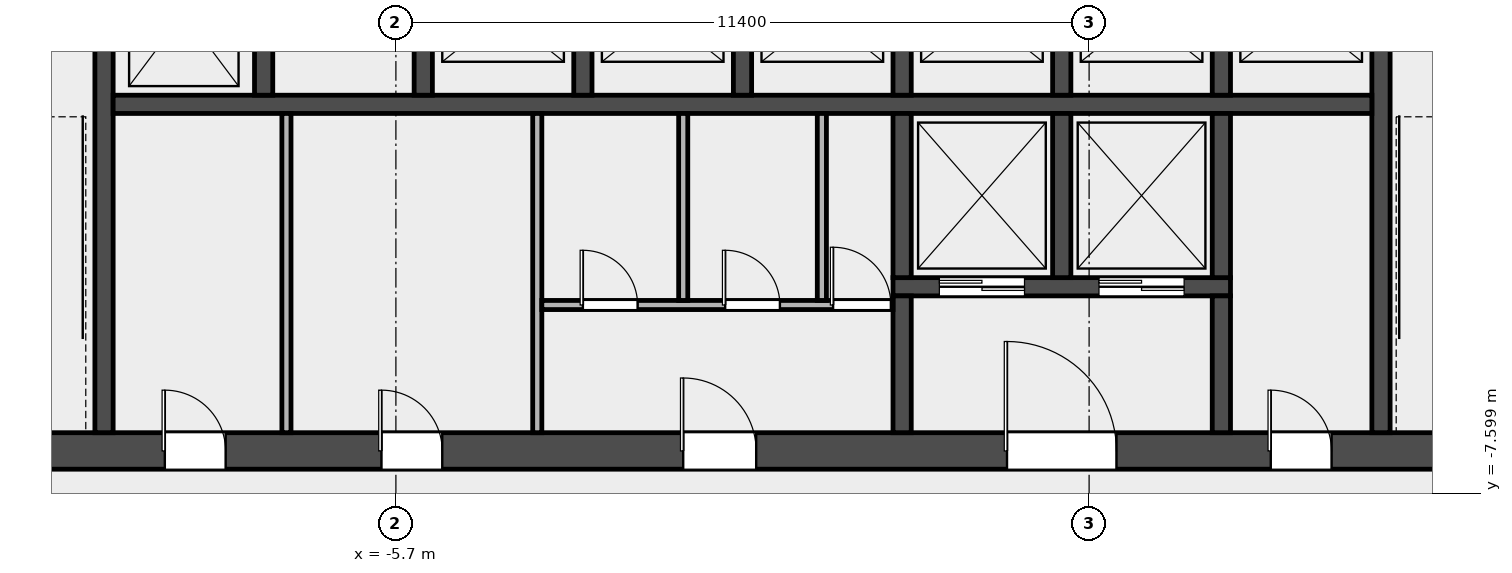
"""IFC4 building model, lengths in metres.
Left out: names, types, materials, properties, quantities, classifications, styles, units other than length and angle.
Written with IfcOpenShell. Run it as: python <this file> out.ifc"""

import sys

from ifc_helpers import new_model, si_unit, direction, frame, frame_2d, origin, place, context, subcontext, project, spatial, rectangle, extrude, element, fill, save


model = new_model("IFC4")
c1 = context("Model", 3, precision=1e-05, world=origin(), true_north=direction((0.0, 1.0)))
c2 = subcontext(c1, "Body", "Model", "MODEL_VIEW")
j1 = project(units=[si_unit("LENGTHUNIT", "METRE"), si_unit("PLANEANGLEUNIT", "RADIAN")], contexts=[c1])
p1 = place(None, origin())
s1 = spatial("IfcSite", under=j1, at=p1, CompositionType="ELEMENT")
p2 = place(p1, origin())
s2 = spatial("IfcBuilding", under=s1, at=p2, CompositionType="ELEMENT")
p3 = place(p2, frame((0.0, 0.0, 55.0)))
s3 = spatial("IfcBuildingStorey", under=s2, at=p3, CompositionType="ELEMENT", Elevation=55.0)
p4 = place(p3, frame((-14.4, -6.9, 0.0), z_axis=(0.0, 0.0, 1.0), x_axis=(1.0, 0.0, 0.0)))
e1 = element("IfcWall", 1, at=p4, inside=s3, PredefinedType="SHEAR", context=c2, shape_type="SweptSolid", body=[
    extrude(rectangle(XDim=28.8, YDim=0.6, at=frame_2d((14.4, 0.0))), origin(), (0.0, 0.0, 1.0), 4.5),
])
p5 = place(p4, frame((4.9, 0.0, 0.0)))
e2 = element("IfcOpeningElement", 2, at=p5, cuts=e1, PredefinedType="OPENING", context=c2, shape_type="SweptSolid", body=[
    extrude(rectangle(XDim=1.0, YDim=2.1, at=frame_2d((0.5, 1.05))), frame((0.0, 0.312, 0.0), z_axis=(0.0, -1.0, 0.0), x_axis=(1.0, 0.0, 0.0)), (0.0, 0.0, 1.0), 0.624),
])
p6 = place(p4, frame((8.462, 0.0, 0.0)))
e3 = element("IfcOpeningElement", 3, at=p6, cuts=e1, PredefinedType="OPENING", context=c2, shape_type="SweptSolid", body=[
    extrude(rectangle(XDim=1.0, YDim=2.1, at=frame_2d((0.5, 1.05))), frame((0.0, 0.312, 0.0), z_axis=(0.0, -1.0, 0.0), x_axis=(1.0, 0.0, 0.0)), (0.0, 0.0, 1.0), 0.624),
])
p7 = place(p4, frame((13.425, 0.0, 0.0)))
e4 = element("IfcOpeningElement", 4, at=p7, cuts=e1, PredefinedType="OPENING", context=c2, shape_type="SweptSolid", body=[
    extrude(rectangle(XDim=1.2, YDim=2.1, at=frame_2d((0.6, 1.05))), frame((0.0, 0.312, 0.0), z_axis=(0.0, -1.0, 0.0), x_axis=(1.0, 0.0, 0.0)), (0.0, 0.0, 1.0), 0.624),
])
p8 = place(p4, frame((18.75, 0.0, 0.0)))
e5 = element("IfcOpeningElement", 5, at=p8, cuts=e1, PredefinedType="OPENING", context=c2, shape_type="SweptSolid", body=[
    extrude(rectangle(XDim=1.8, YDim=2.1, at=frame_2d((0.9, 1.05))), frame((0.0, 0.312, 0.0), z_axis=(0.0, -1.0, 0.0), x_axis=(1.0, 0.0, 0.0)), (0.0, 0.0, 1.0), 0.624),
])
p9 = place(p4, frame((23.087, 0.0, 0.0)))
e6 = element("IfcOpeningElement", 6, at=p9, cuts=e1, PredefinedType="OPENING", context=c2, shape_type="SweptSolid", body=[
    extrude(rectangle(XDim=1.0, YDim=2.1, at=frame_2d((0.5, 1.05))), frame((0.0, 0.312, 0.0), z_axis=(0.0, -1.0, 0.0), x_axis=(1.0, 0.0, 0.0)), (0.0, 0.0, 1.0), 0.624),
])
for number, where, z_axis, x_axis in (
    (7, (-10.5, -6.6, 0.0), (0.0, 0.0, 1.0), (0.0, 1.0, 0.0)),
    (8, (10.5, -6.6, 0.0), (0.0, 0.0, 1.0), (0.0, 1.0, 0.0)),
):
    element("IfcWall", number, at=place(p3, frame(where, z_axis=z_axis, x_axis=x_axis)), inside=s3, PredefinedType="SHEAR", context=c2, shape_type="SweptSolid", body=[
        extrude(rectangle(XDim=8.55, YDim=0.3, at=frame_2d((4.275, 0.0))), origin(), (0.0, 0.0, 1.0), 4.5),
    ])
p10 = place(p3, frame((-10.35, -1.2, 0.0), z_axis=(0.0, 0.0, 1.0), x_axis=(1.0, 0.0, 0.0)))
e9 = element("IfcWall", 9, at=p10, inside=s3, PredefinedType="SOLIDWALL", context=c2, shape_type="SweptSolid", body=[
    extrude(rectangle(XDim=20.7, YDim=0.3, at=frame_2d((10.35, 0.0))), origin(), (0.0, 0.0, 1.0), 4.5),
])
for number, where, z_axis, x_axis in (
    (10, (-7.875, -1.05, 0.0), (0.0, 0.0, 1.0), (0.0, 1.0, 0.0)),
    (11, (-5.25, -1.05, 0.0), (0.0, 0.0, 1.0), (0.0, 1.0, 0.0)),
    (12, (-2.625, -1.05, 0.0), (0.0, 0.0, 1.0), (0.0, 1.0, 0.0)),
    (13, (0.0, -1.05, 0.0), (0.0, 0.0, 1.0), (0.0, 1.0, 0.0)),
    (14, (2.625, -1.05, 0.0), (0.0, 0.0, 1.0), (0.0, 1.0, 0.0)),
    (15, (5.25, -1.05, 0.0), (0.0, 0.0, 1.0), (0.0, 1.0, 0.0)),
    (16, (7.875, -1.05, 0.0), (0.0, 0.0, 1.0), (0.0, 1.0, 0.0)),
):
    element("IfcWall", number, at=place(p3, frame(where, z_axis=z_axis, x_axis=x_axis)), inside=s3, PredefinedType="SOLIDWALL", context=c2, shape_type="SweptSolid", body=[
        extrude(rectangle(XDim=2.7, YDim=0.3, at=frame_2d((1.35, 0.0))), origin(), (0.0, 0.0, 1.0), 4.5),
    ])
p11 = place(p3, frame((2.475, -4.2, 0.0), z_axis=(0.0, 0.0, 1.0), x_axis=(1.0, 0.0, 0.0)))
e17 = element("IfcWall", 17, at=p11, inside=s3, PredefinedType="SOLIDWALL", context=c2, shape_type="SweptSolid", body=[
    extrude(rectangle(XDim=5.55, YDim=0.3, at=frame_2d((2.775, 0.0))), origin(), (0.0, 0.0, 1.0), 4.5),
])
p12 = place(p11, frame((0.762, 0.0, 0.0)))
e18 = element("IfcOpeningElement", 18, at=p12, cuts=e17, PredefinedType="OPENING", context=c2, shape_type="SweptSolid", body=[
    extrude(rectangle(XDim=1.4, YDim=2.1, at=frame_2d((0.7, 1.05))), frame((0.0, 0.162, 0.0), z_axis=(0.0, -1.0, 0.0), x_axis=(1.0, 0.0, 0.0)), (0.0, 0.0, 1.0), 0.324),
])
p13 = place(p11, frame((3.387, 0.0, 0.0)))
e19 = element("IfcOpeningElement", 19, at=p13, cuts=e17, PredefinedType="OPENING", context=c2, shape_type="SweptSolid", body=[
    extrude(rectangle(XDim=1.4, YDim=2.1, at=frame_2d((0.7, 1.05))), frame((0.0, 0.162, 0.0), z_axis=(0.0, -1.0, 0.0), x_axis=(1.0, 0.0, 0.0)), (0.0, 0.0, 1.0), 0.324),
])
p14 = place(p3, frame((2.625, -4.05, 0.0), z_axis=(0.0, 0.0, 1.0), x_axis=(0.0, 1.0, 0.0)))
e20 = element("IfcWall", 20, at=p14, inside=s3, PredefinedType="SOLIDWALL", context=c2, shape_type="SweptSolid", body=[
    extrude(rectangle(XDim=2.7, YDim=0.3, at=frame_2d((1.35, 0.0))), origin(), (0.0, 0.0, 1.0), 4.5),
])
p15 = place(p3, frame((2.625, -6.6, 0.0), z_axis=(0.0, 0.0, 1.0), x_axis=(0.0, 1.0, 0.0)))
e21 = element("IfcWall", 21, at=p15, inside=s3, PredefinedType="SOLIDWALL", context=c2, shape_type="SweptSolid", body=[
    extrude(rectangle(XDim=2.25, YDim=0.3, at=frame_2d((1.125, 0.0))), origin(), (0.0, 0.0, 1.0), 4.5),
])
for number, where, z_axis, x_axis in (
    (22, (5.25, -4.05, 0.0), (0.0, 0.0, 1.0), (0.0, 1.0, 0.0)),
    (23, (7.875, -4.05, 0.0), (0.0, 0.0, 1.0), (0.0, 1.0, 0.0)),
):
    element("IfcWall", number, at=place(p3, frame(where, z_axis=z_axis, x_axis=x_axis)), inside=s3, PredefinedType="SOLIDWALL", context=c2, shape_type="SweptSolid", body=[
        extrude(rectangle(XDim=2.7, YDim=0.3, at=frame_2d((1.35, 0.0))), origin(), (0.0, 0.0, 1.0), 4.5),
    ])
p16 = place(p3, frame((7.875, -6.6, 0.0), z_axis=(0.0, 0.0, 1.0), x_axis=(0.0, 1.0, 0.0)))
e24 = element("IfcWall", 24, at=p16, inside=s3, PredefinedType="SOLIDWALL", context=c2, shape_type="SweptSolid", body=[
    extrude(rectangle(XDim=2.25, YDim=0.3, at=frame_2d((1.125, 0.0))), origin(), (0.0, 0.0, 1.0), 4.5),
])
for number, where, z_axis, x_axis in (
    (25, (-7.5, -6.6, 0.0), (0.0, 0.0, 1.0), (0.0, 1.0, 0.0)),
    (26, (-3.375, -6.6, 0.0), (0.0, 0.0, 1.0), (0.0, 1.0, 0.0)),
):
    element("IfcWall", number, at=place(p3, frame(where, z_axis=z_axis, x_axis=x_axis)), inside=s3, PredefinedType="PARTITIONING", context=c2, shape_type="SweptSolid", body=[
        extrude(rectangle(XDim=5.25, YDim=0.15, at=frame_2d((2.625, 0.0))), origin(), (0.0, 0.0, 1.0), 4.5),
    ])
p17 = place(p3, frame((-3.3, -4.5, 0.0), z_axis=(0.0, 0.0, 1.0), x_axis=(1.0, 0.0, 0.0)))
e27 = element("IfcWall", 27, at=p17, inside=s3, PredefinedType="PARTITIONING", context=c2, shape_type="SweptSolid", body=[
    extrude(rectangle(XDim=5.775, YDim=0.15, at=frame_2d((2.888, 0.0))), origin(), (0.0, 0.0, 1.0), 4.5),
])
p18 = place(p17, frame((0.675, 0.0, 0.0)))
e28 = element("IfcOpeningElement", 28, at=p18, cuts=e27, PredefinedType="OPENING", context=c2, shape_type="SweptSolid", body=[
    extrude(rectangle(XDim=0.9, YDim=2.1, at=frame_2d((0.45, 1.05))), frame((0.0, 0.087, 0.0), z_axis=(0.0, -1.0, 0.0), x_axis=(1.0, 0.0, 0.0)), (0.0, 0.0, 1.0), 0.174),
])
p19 = place(p17, frame((3.015, 0.0, 0.0)))
e29 = element("IfcOpeningElement", 29, at=p19, cuts=e27, PredefinedType="OPENING", context=c2, shape_type="SweptSolid", body=[
    extrude(rectangle(XDim=0.9, YDim=2.1, at=frame_2d((0.45, 1.05))), frame((0.0, 0.087, 0.0), z_axis=(0.0, -1.0, 0.0), x_axis=(1.0, 0.0, 0.0)), (0.0, 0.0, 1.0), 0.174),
])
p20 = place(p17, frame((4.79, 0.0, 0.0)))
e30 = element("IfcOpeningElement", 30, at=p20, cuts=e27, PredefinedType="OPENING", context=c2, shape_type="SweptSolid", body=[
    extrude(rectangle(XDim=0.95, YDim=2.1, at=frame_2d((0.475, 1.05))), frame((0.0, 0.087, 0.0), z_axis=(0.0, -1.0, 0.0), x_axis=(1.0, 0.0, 0.0)), (0.0, 0.0, 1.0), 0.174),
])
for number, where, z_axis, x_axis in (
    (31, (-0.975, -4.425, 0.0), (0.0, 0.0, 1.0), (0.0, 1.0, 0.0)),
    (32, (1.305, -4.425, 0.0), (0.0, 0.0, 1.0), (0.0, 1.0, 0.0)),
):
    element("IfcWall", number, at=place(p3, frame(where, z_axis=z_axis, x_axis=x_axis)), inside=s3, PredefinedType="PARTITIONING", context=c2, shape_type="SweptSolid", body=[
        extrude(rectangle(XDim=3.075, YDim=0.15, at=frame_2d((1.538, 0.0))), origin(), (0.0, 0.0, 1.0), 4.5),
    ])
p21 = place(p12, origin())
e33 = element("IfcDoor", 33, at=p21, inside=s3, OperationType="DOUBLE_DOOR_SLIDING", PredefinedType="DOOR", context=c2, shape_type="SweptSolid", body=[
    extrude(rectangle(XDim=1.4, YDim=2.1, at=frame_2d((0.7, 1.05))), frame((0.0, 0.025, 0.0), z_axis=(0.0, -1.0, 0.0), x_axis=(1.0, 0.0, 0.0)), (0.0, 0.0, 1.0), 0.05),
])
fill(e18, e33)
p22 = place(p13, origin())
e34 = element("IfcDoor", 34, at=p22, inside=s3, OperationType="DOUBLE_DOOR_SLIDING", PredefinedType="DOOR", context=c2, shape_type="SweptSolid", body=[
    extrude(rectangle(XDim=1.4, YDim=2.1, at=frame_2d((0.7, 1.05))), frame((0.0, 0.025, 0.0), z_axis=(0.0, -1.0, 0.0), x_axis=(1.0, 0.0, 0.0)), (0.0, 0.0, 1.0), 0.05),
])
fill(e19, e34)
p23 = place(p5, origin())
e35 = element("IfcDoor", 35, at=p23, inside=s3, OperationType="SINGLE_SWING_LEFT", PredefinedType="DOOR", context=c2, shape_type="SweptSolid", body=[
    extrude(rectangle(XDim=1.0, YDim=2.1, at=frame_2d((0.5, 1.05))), frame((0.0, 0.025, 0.0), z_axis=(0.0, -1.0, 0.0), x_axis=(1.0, 0.0, 0.0)), (0.0, 0.0, 1.0), 0.05),
])
fill(e2, e35)
p24 = place(p6, origin())
e36 = element("IfcDoor", 36, at=p24, inside=s3, OperationType="SINGLE_SWING_LEFT", PredefinedType="DOOR", context=c2, shape_type="SweptSolid", body=[
    extrude(rectangle(XDim=1.0, YDim=2.1, at=frame_2d((0.5, 1.05))), frame((0.0, 0.025, 0.0), z_axis=(0.0, -1.0, 0.0), x_axis=(1.0, 0.0, 0.0)), (0.0, 0.0, 1.0), 0.05),
])
fill(e3, e36)
p25 = place(p7, origin())
e37 = element("IfcDoor", 37, at=p25, inside=s3, OperationType="SINGLE_SWING_LEFT", PredefinedType="DOOR", context=c2, shape_type="SweptSolid", body=[
    extrude(rectangle(XDim=1.2, YDim=2.1, at=frame_2d((0.6, 1.05))), frame((0.0, 0.025, 0.0), z_axis=(0.0, -1.0, 0.0), x_axis=(1.0, 0.0, 0.0)), (0.0, 0.0, 1.0), 0.05),
])
fill(e4, e37)
p26 = place(p18, origin())
e38 = element("IfcDoor", 38, at=p26, inside=s3, OperationType="SINGLE_SWING_LEFT", PredefinedType="DOOR", context=c2, shape_type="SweptSolid", body=[
    extrude(rectangle(XDim=0.9, YDim=2.1, at=frame_2d((0.45, 1.05))), frame((0.0, 0.025, 0.0), z_axis=(0.0, -1.0, 0.0), x_axis=(1.0, 0.0, 0.0)), (0.0, 0.0, 1.0), 0.05),
])
fill(e28, e38)
p27 = place(p19, origin())
e39 = element("IfcDoor", 39, at=p27, inside=s3, OperationType="SINGLE_SWING_LEFT", PredefinedType="DOOR", context=c2, shape_type="SweptSolid", body=[
    extrude(rectangle(XDim=0.9, YDim=2.1, at=frame_2d((0.45, 1.05))), frame((0.0, 0.025, 0.0), z_axis=(0.0, -1.0, 0.0), x_axis=(1.0, 0.0, 0.0)), (0.0, 0.0, 1.0), 0.05),
])
fill(e29, e39)
p28 = place(p20, origin())
e40 = element("IfcDoor", 40, at=p28, inside=s3, OperationType="SINGLE_SWING_LEFT", PredefinedType="DOOR", context=c2, shape_type="SweptSolid", body=[
    extrude(rectangle(XDim=0.95, YDim=2.1, at=frame_2d((0.475, 1.05))), frame((0.0, 0.025, 0.0), z_axis=(0.0, -1.0, 0.0), x_axis=(1.0, 0.0, 0.0)), (0.0, 0.0, 1.0), 0.05),
])
fill(e30, e40)
p29 = place(p8, origin())
e41 = element("IfcDoor", 41, at=p29, inside=s3, OperationType="DOUBLE_DOOR_SINGLE_SWING", PredefinedType="DOOR", context=c2, shape_type="SweptSolid", body=[
    extrude(rectangle(XDim=1.8, YDim=2.1, at=frame_2d((0.9, 1.05))), frame((0.0, 0.025, 0.0), z_axis=(0.0, -1.0, 0.0), x_axis=(1.0, 0.0, 0.0)), (0.0, 0.0, 1.0), 0.05),
])
fill(e5, e41)
p30 = place(p9, origin())
e42 = element("IfcDoor", 42, at=p30, inside=s3, OperationType="SINGLE_SWING_LEFT", PredefinedType="DOOR", context=c2, shape_type="SweptSolid", body=[
    extrude(rectangle(XDim=1.0, YDim=2.1, at=frame_2d((0.5, 1.05))), frame((0.0, 0.025, 0.0), z_axis=(0.0, -1.0, 0.0), x_axis=(1.0, 0.0, 0.0)), (0.0, 0.0, 1.0), 0.05),
])
fill(e6, e42)
save(model, sys.argv[1])
